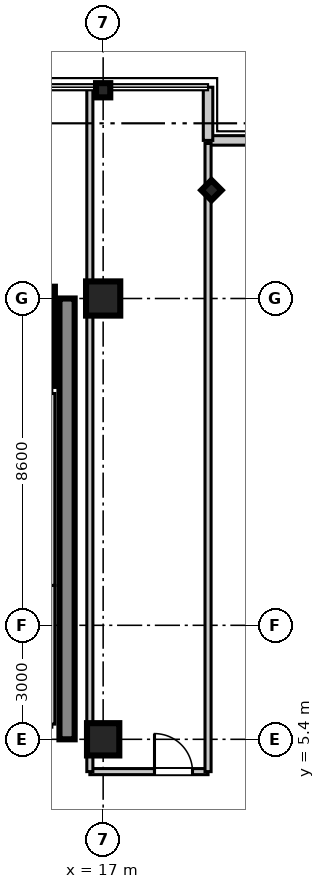
"""IFC4 building model, lengths in metres.
Left out: names, types, materials, properties, quantities, classifications, styles, units other than length and angle.
Written with IfcOpenShell. Run it as: python <this file> out.ifc"""

import sys

from ifc_helpers import new_model, si_unit, direction, frame, frame_2d, origin, origin_2d, place, context, subcontext, project, spatial, rectangle, i_section, extrude, source, transform, mapped, element, fill, save


model = new_model("IFC4")
c1 = context("Model", 3, precision=1e-05, world=origin(), true_north=direction((0.0, 1.0)))
c2 = subcontext(c1, "Body", "Model", "MODEL_VIEW")
j1 = project(units=[si_unit("LENGTHUNIT", "METRE"), si_unit("PLANEANGLEUNIT", "RADIAN")], contexts=[c1])
p1 = place(None, origin())
s1 = spatial("IfcSite", under=j1, at=p1, CompositionType="ELEMENT")
p2 = place(p1, origin())
s2 = spatial("IfcBuilding", under=s1, at=p2, CompositionType="ELEMENT")
p3 = place(p2, frame((0.0, 0.0, 281.3)))
s3 = spatial("IfcBuildingStorey", under=s2, at=p3, CompositionType="ELEMENT", Elevation=281.3)
m1 = source(origin(), c2, "Body", "SweptSolid", [
    extrude(rectangle(XDim=0.85, YDim=0.85, at=origin_2d()), origin(), (0.0, 0.0, 1.0), 3.705),
])
p4 = place(p3, frame((17.0, 5.4, 0.0), z_axis=(0.0, 0.0, 1.0), x_axis=(1.0, 0.0, 0.0)))
e1 = element("IfcColumn", 1, at=p4, inside=s3, PredefinedType="PILASTER", context=c2, shape_type="MappedRepresentation", body=[
    mapped(m1, transform((0.0, 0.0, 0.0), scale=1.0)),
])
m2 = source(origin(), c2, "Body", "SweptSolid", [
    extrude(rectangle(XDim=0.9, YDim=0.9, at=origin_2d()), origin(), (0.0, 0.0, 1.0), 3.705),
])
p5 = place(p3, frame((17.0, 17.0, 0.0), z_axis=(0.0, 0.0, 1.0), x_axis=(1.0, 0.0, 0.0)))
e2 = element("IfcColumn", 2, at=p5, inside=s3, PredefinedType="COLUMN", context=c2, shape_type="MappedRepresentation", body=[
    mapped(m2, transform((0.0, 0.0, 0.0), scale=1.0)),
])
m3 = source(origin(), c2, "Body", "SweptSolid", [
    extrude(i_section(OverallWidth=0.374, OverallDepth=0.374, WebThickness=0.014, FlangeThickness=0.023, at=origin_2d()), origin(), (0.0, 0.0, 1.0), 3.705),
])
for number, where, z_axis, x_axis in (
    (3, (17.0, 22.48, 0.0), (0.0, 0.0, 1.0), (0.0, 1.0, 0.0)),
    (4, (19.85, 19.85, 0.0), (0.0, 0.0, 1.0), (0.707, 0.707, 0.0)),
):
    element("IfcColumn", number, at=place(p3, frame(where, z_axis=z_axis, x_axis=x_axis)), inside=s3, PredefinedType="COLUMN", context=c2, shape_type="MappedRepresentation", body=[
        mapped(m3, transform((0.0, 0.0, 0.0), scale=1.0)),
    ])
m4 = source(origin(), c2, "Body", "SweptSolid", [
    extrude(rectangle(XDim=11.6, YDim=0.4, at=frame_2d((5.8, 0.0))), origin(), (0.0, 0.0, 1.0), 3.45),
])
p6 = place(p3, frame((16.05, 5.4, 0.0), z_axis=(0.0, 0.0, 1.0), x_axis=(0.0, 1.0, 0.0)))
e5 = element("IfcWall", 5, at=p6, inside=s3, PredefinedType="SHEAR", context=c2, shape_type="MappedRepresentation", body=[
    mapped(m4, transform((0.0, 0.0, 0.0), scale=1.0)),
])
m5 = source(origin(), c2, "Body", "SweptSolid", [
    extrude(rectangle(XDim=2.61, YDim=0.22, at=frame_2d((1.305, 0.0))), origin(), (0.0, 0.0, 1.0), 3.45),
])
p7 = place(p3, frame((15.62, 14.7, 0.0), z_axis=(0.0, 0.0, 1.0), x_axis=(0.0, 1.0, 0.0)))
e6 = element("IfcWall", 6, at=p7, inside=s3, PredefinedType="SHEAR", context=c2, shape_type="MappedRepresentation", body=[
    mapped(m5, transform((0.0, 0.0, 0.0), scale=1.0)),
])
m6 = source(origin(), c2, "Body", "SweptSolid", [
    extrude(rectangle(XDim=1.4, YDim=0.25, at=frame_2d((0.7, 0.0))), origin(), (0.0, 0.0, 1.0), 3.45),
])
p8 = place(p3, frame((19.76, 21.16, 0.0), z_axis=(0.0, 0.0, 1.0), x_axis=(1.0, 0.0, 0.0)))
e7 = element("IfcWall", 7, at=p8, inside=s3, PredefinedType="STANDARD", context=c2, shape_type="MappedRepresentation", body=[
    mapped(m6, transform((0.0, 0.0, 0.0), scale=1.0)),
])
m7 = source(origin(), c2, "Body", "SweptSolid", [
    extrude(rectangle(XDim=1.4, YDim=0.25, at=frame_2d((0.7, 0.0))), origin(), (0.0, 0.0, 1.0), 3.45),
])
p9 = place(p3, frame((19.76, 21.16, 0.0), z_axis=(0.0, 0.0, 1.0), x_axis=(0.0, 1.0, 0.0)))
e8 = element("IfcWall", 8, at=p9, inside=s3, PredefinedType="STANDARD", context=c2, shape_type="MappedRepresentation", body=[
    mapped(m7, transform((0.0, 0.0, 0.0), scale=1.0)),
])
m8 = source(origin(), c2, "Body", "SweptSolid", [
    extrude(rectangle(XDim=3.65, YDim=0.16, at=frame_2d((1.825, 0.0))), origin(), (0.0, 0.0, 1.0), 2.79),
])
p10 = place(p3, frame((15.65, 5.8, 0.0), z_axis=(0.0, 0.0, 1.0), x_axis=(0.0, 1.0, 0.0)))
e9 = element("IfcWall", 9, at=p10, inside=s3, PredefinedType="PARTITIONING", context=c2, shape_type="MappedRepresentation", body=[
    mapped(m8, transform((0.0, 0.0, 0.0), scale=1.0)),
])
m9 = source(origin(), c2, "Body", "SweptSolid", [
    extrude(rectangle(XDim=5.05, YDim=0.16, at=frame_2d((2.525, 0.0))), origin(), (0.0, 0.0, 1.0), 2.79),
])
p11 = place(p3, frame((15.65, 9.45, 0.0), z_axis=(0.0, 0.0, 1.0), x_axis=(0.0, 1.0, 0.0)))
e10 = element("IfcWall", 10, at=p11, inside=s3, PredefinedType="PARTITIONING", context=c2, shape_type="MappedRepresentation", body=[
    mapped(m9, transform((0.0, 0.0, 0.0), scale=1.0)),
])
m10 = source(origin(), c2, "Body", "SweptSolid", [
    extrude(rectangle(XDim=3.11, YDim=0.16, at=frame_2d((1.555, 0.0))), origin(), (0.0, 0.0, 1.0), 2.79),
])
p12 = place(p3, frame((16.65, 4.55, 0.0), z_axis=(0.0, 0.0, 1.0), x_axis=(1.0, 0.0, 0.0)))
e11 = element("IfcWall", 11, at=p12, inside=s3, PredefinedType="PARTITIONING", context=c2, shape_type="MappedRepresentation", body=[
    mapped(m10, transform((0.0, 0.0, 0.0), scale=1.0)),
])
p13 = place(p12, frame((1.701, 0.0, 0.0)))
e12 = element("IfcOpeningElement", 12, at=p13, cuts=e11, PredefinedType="OPENING", context=c2, shape_type="SweptSolid", body=[
    extrude(rectangle(XDim=1.0, YDim=2.1, at=frame_2d((0.5, 1.05))), frame((0.0, 0.09, 0.0), z_axis=(0.0, -1.0, 0.0), x_axis=(1.0, 0.0, 0.0)), (0.0, 0.0, 1.0), 0.18),
])
m11 = source(origin(), c2, "Body", "SweptSolid", [
    extrude(rectangle(XDim=17.95, YDim=0.16, at=frame_2d((8.975, 0.0))), origin(), (0.0, 0.0, 1.0), 2.79),
])
p14 = place(p3, frame((16.65, 4.55, 0.0), z_axis=(0.0, 0.0, 1.0), x_axis=(0.0, 1.0, 0.0)))
e13 = element("IfcWall", 13, at=p14, inside=s3, PredefinedType="PARTITIONING", context=c2, shape_type="MappedRepresentation", body=[
    mapped(m11, transform((0.0, 0.0, 0.0), scale=1.0)),
])
m12 = source(origin(), c2, "Body", "SweptSolid", [
    extrude(rectangle(XDim=16.53, YDim=0.16, at=frame_2d((8.265, 0.0))), origin(), (0.0, 0.0, 1.0), 2.79),
])
p15 = place(p3, frame((19.76, 4.55, 0.0), z_axis=(0.0, 0.0, 1.0), x_axis=(0.0, 1.0, 0.0)))
e14 = element("IfcWall", 14, at=p15, inside=s3, PredefinedType="PARTITIONING", context=c2, shape_type="MappedRepresentation", body=[
    mapped(m12, transform((0.0, 0.0, 0.0), scale=1.0)),
])
m13 = source(origin(), c2, "Body", "SweptSolid", [
    extrude(rectangle(XDim=1.0, YDim=2.1, at=frame_2d((0.5, 1.05))), frame((0.0, 0.025, 0.0), z_axis=(0.0, -1.0, 0.0), x_axis=(1.0, 0.0, 0.0)), (0.0, 0.0, 1.0), 0.05),
])
p16 = place(p13, origin())
e15 = element("IfcDoor", 15, at=p16, inside=s3, OperationType="SINGLE_SWING_LEFT", PredefinedType="DOOR", context=c2, shape_type="MappedRepresentation", body=[
    mapped(m13, transform((0.0, 0.0, 0.0), scale=1.0)),
])
fill(e12, e15)
save(model, sys.argv[1])
